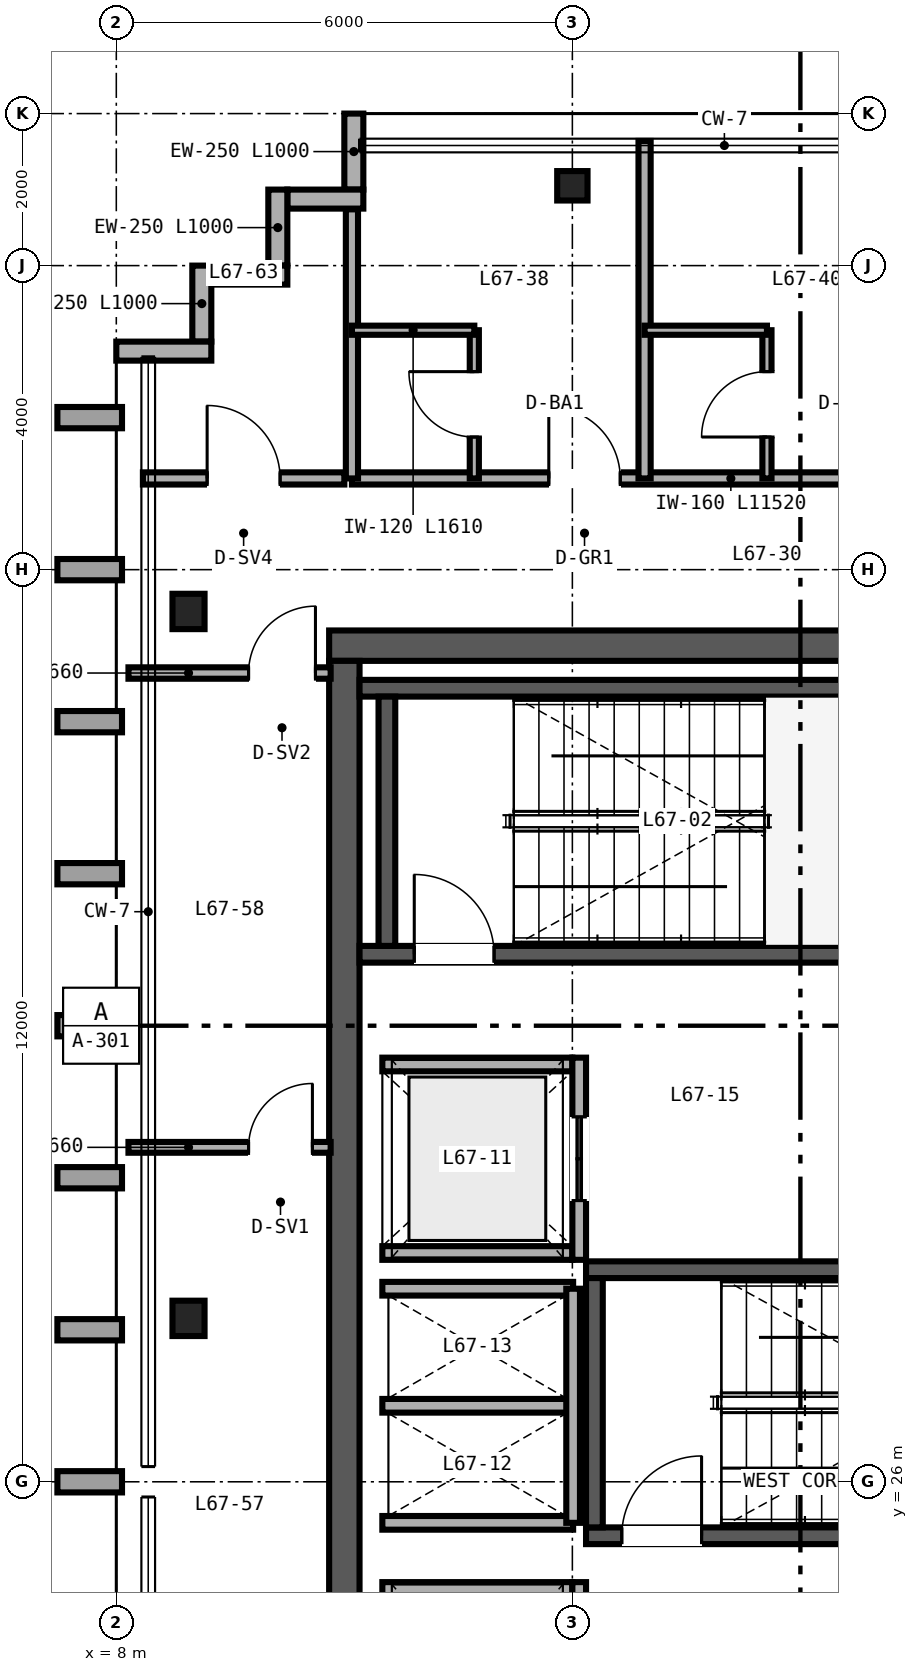
"""IFC4 building model, lengths in metres.
Left out: names, types, materials, properties, quantities, classifications, styles, units other than length and angle.
Written with IfcOpenShell. Run it as: python <this file> out.ifc"""

import sys

from ifc_helpers import new_model, si_unit, direction, frame, frame_2d, origin, origin_2d, place, context, subcontext, project, spatial, rectangle, i_section, extrude, source, transform, mapped, element, fill, save


model = new_model("IFC4")
c1 = context("Model", 3, precision=1e-05, world=origin(), true_north=direction((0.0, 1.0)))
c2 = subcontext(c1, "Body", "Model", "MODEL_VIEW")
j1 = project(units=[si_unit("LENGTHUNIT", "METRE"), si_unit("PLANEANGLEUNIT", "RADIAN")], contexts=[c1])
p1 = place(None, origin())
s1 = spatial("IfcSite", under=j1, at=p1, CompositionType="ELEMENT")
p2 = place(p1, origin())
s2 = spatial("IfcBuilding", under=s1, at=p2, CompositionType="ELEMENT")
p3 = place(p2, frame((0.0, 0.0, 265.2)))
s3 = spatial("IfcBuildingStorey", under=s2, at=p3, CompositionType="ELEMENT", Elevation=265.2)
p4 = place(p3, frame((10.8, 37.0, 0.0), z_axis=(0.0, 0.0, 1.0), x_axis=(1.0, 0.0, 0.0)))
e1 = element("IfcWall", 1, at=p4, inside=s3, PredefinedType="SHEAR", context=c2, shape_type="SweptSolid", body=[
    extrude(rectangle(XDim=12.4, YDim=0.4, at=frame_2d((6.2, 0.0))), origin(), (0.0, 0.0, 1.0), 3.38),
])
p5 = place(p4, frame((8.78, 0.0, 0.0)))
e2 = element("IfcOpeningElement", 2, at=p5, cuts=e1, PredefinedType="OPENING", context=c2, shape_type="SweptSolid", body=[
    extrude(rectangle(XDim=1.0, YDim=2.15, at=frame_2d((0.5, 1.075))), frame((0.0, 0.21, 0.0), z_axis=(0.0, -1.0, 0.0), x_axis=(1.0, 0.0, 0.0)), (0.0, 0.0, 1.0), 0.42),
])
p6 = place(p3, frame((11.0, 15.2, 0.0), z_axis=(0.0, 0.0, 1.0), x_axis=(0.0, 1.0, 0.0)))
e3 = element("IfcWall", 3, at=p6, inside=s3, PredefinedType="SHEAR", context=c2, shape_type="SweptSolid", body=[
    extrude(rectangle(XDim=21.6, YDim=0.4, at=frame_2d((10.8, 0.0))), origin(), (0.0, 0.0, 1.0), 3.38),
])
p7 = place(p3, frame((11.2, 32.94, 0.0), z_axis=(0.0, 0.0, 1.0), x_axis=(1.0, 0.0, 0.0)))
e4 = element("IfcWall", 4, at=p7, inside=s3, PredefinedType="SHEAR", context=c2, shape_type="SweptSolid", body=[
    extrude(rectangle(XDim=8.11, YDim=0.22, at=frame_2d((4.055, 0.0))), origin(), (0.0, 0.0, 1.0), 3.4),
])
p8 = place(p7, frame((0.72, 0.0, 0.0)))
e5 = element("IfcOpeningElement", 5, at=p8, cuts=e4, PredefinedType="OPENING", context=c2, shape_type="SweptSolid", body=[
    extrude(rectangle(XDim=1.05, YDim=2.15, at=frame_2d((0.525, 1.075))), frame((0.0, 0.12, 0.0), z_axis=(0.0, -1.0, 0.0), x_axis=(1.0, 0.0, 0.0)), (0.0, 0.0, 1.0), 0.24),
])
p9 = place(p3, frame((11.2, 36.44, 0.0), z_axis=(0.0, 0.0, 1.0), x_axis=(1.0, 0.0, 0.0)))
e6 = element("IfcWall", 6, at=p9, inside=s3, PredefinedType="SHEAR", context=c2, shape_type="SweptSolid", body=[
    extrude(rectangle(XDim=8.11, YDim=0.22, at=frame_2d((4.055, 0.0))), origin(), (0.0, 0.0, 1.0), 3.4),
])
p10 = place(p3, frame((11.56, 33.05, 0.0), z_axis=(0.0, 0.0, 1.0), x_axis=(0.0, 1.0, 0.0)))
e7 = element("IfcWall", 7, at=p10, inside=s3, PredefinedType="SHEAR", context=c2, shape_type="SweptSolid", body=[
    extrude(rectangle(XDim=3.28, YDim=0.22, at=frame_2d((1.64, 0.0))), origin(), (0.0, 0.0, 1.0), 3.4),
])
p11 = place(p3, frame((14.18, 25.29, 0.0), z_axis=(0.0, 0.0, 1.0), x_axis=(1.0, 0.0, 0.0)))
e8 = element("IfcWall", 8, at=p11, inside=s3, PredefinedType="SHEAR", context=c2, shape_type="SweptSolid", body=[
    extrude(rectangle(XDim=8.62, YDim=0.22, at=frame_2d((4.31, 0.0))), origin(), (0.0, 0.0, 1.0), 3.4),
])
p12 = place(p11, frame((0.47, 0.0, 0.0)))
e9 = element("IfcOpeningElement", 9, at=p12, cuts=e8, PredefinedType="OPENING", context=c2, shape_type="SweptSolid", body=[
    extrude(rectangle(XDim=1.05, YDim=2.15, at=frame_2d((0.525, 1.075))), frame((0.0, 0.12, 0.0), z_axis=(0.0, -1.0, 0.0), x_axis=(1.0, 0.0, 0.0)), (0.0, 0.0, 1.0), 0.24),
])
p13 = place(p3, frame((14.18, 28.79, 0.0), z_axis=(0.0, 0.0, 1.0), x_axis=(1.0, 0.0, 0.0)))
e10 = element("IfcWall", 10, at=p13, inside=s3, PredefinedType="SHEAR", context=c2, shape_type="SweptSolid", body=[
    extrude(rectangle(XDim=8.62, YDim=0.22, at=frame_2d((4.31, 0.0))), origin(), (0.0, 0.0, 1.0), 3.4),
])
p14 = place(p3, frame((14.29, 25.4, 0.0), z_axis=(0.0, 0.0, 1.0), x_axis=(0.0, 1.0, 0.0)))
e11 = element("IfcWall", 11, at=p14, inside=s3, PredefinedType="SHEAR", context=c2, shape_type="SweptSolid", body=[
    extrude(rectangle(XDim=3.28, YDim=0.22, at=frame_2d((1.64, 0.0))), origin(), (0.0, 0.0, 1.0), 3.4),
])
m1 = source(origin(), c2, "Body", "SweptSolid", [
    extrude(i_section(OverallWidth=0.422, OverallDepth=0.465, WebThickness=0.045, FlangeThickness=0.073, FilletRadius=0.025, at=origin_2d()), origin(), (0.0, 0.0, 1.0), 3.38),
])
for number, where, z_axis, x_axis in (
    (12, (8.95, 28.15, 0.0), (0.0, 0.0, 1.0), (1.0, 0.0, 0.0)),
    (13, (8.95, 37.45, 0.0), (0.0, 0.0, 1.0), (1.0, 0.0, 0.0)),
):
    element("IfcColumn", number, at=place(p3, frame(where, z_axis=z_axis, x_axis=x_axis)), inside=s3, PredefinedType="COLUMN", context=c2, shape_type="MappedRepresentation", body=[
        mapped(m1, transform((0.0, 0.0, 0.0), scale=1.0)),
    ])
m2 = source(origin(), c2, "Body", "SweptSolid", [
    extrude(i_section(OverallWidth=0.399, OverallDepth=0.387, WebThickness=0.021, FlangeThickness=0.033, FilletRadius=0.025, at=origin_2d()), origin(), (0.0, 0.0, 1.0), 3.38),
])
p15 = place(p3, frame((14.0, 43.05, 0.0), z_axis=(0.0, 0.0, 1.0), x_axis=(1.0, 0.0, 0.0)))
e14 = element("IfcColumn", 14, at=p15, inside=s3, PredefinedType="COLUMN", context=c2, shape_type="MappedRepresentation", body=[
    mapped(m2, transform((0.0, 0.0, 0.0), scale=1.0)),
])
for number, where, z_axis, x_axis in (
    (15, (11.125, 44.0, 0.0), (0.0, 0.0, 1.0), (0.0, -1.0, 0.0)),
    (16, (11.25, 42.875, 0.0), (0.0, 0.0, 1.0), (-1.0, 0.0, 0.0)),
    (17, (10.125, 43.0, 0.0), (0.0, 0.0, 1.0), (0.0, -1.0, 0.0)),
    (18, (10.25, 41.875, 0.0), (0.0, 0.0, 1.0), (-1.0, 0.0, 0.0)),
    (19, (9.125, 42.0, 0.0), (0.0, 0.0, 1.0), (0.0, -1.0, 0.0)),
):
    element("IfcWall", number, at=place(p3, frame(where, z_axis=z_axis, x_axis=x_axis)), inside=s3, PredefinedType="SOLIDWALL", context=c2, shape_type="SweptSolid", body=[
        extrude(rectangle(XDim=1.0, YDim=0.25, at=frame_2d((0.5, 0.0))), origin(), (0.0, 0.0, 1.0), 3.38),
    ])
p16 = place(p3, frame((9.25, 40.875, 0.0), z_axis=(0.0, 0.0, 1.0), x_axis=(-1.0, 0.0, 0.0)))
e20 = element("IfcWall", 20, at=p16, inside=s3, PredefinedType="SOLIDWALL", context=c2, shape_type="SweptSolid", body=[
    extrude(rectangle(XDim=1.25, YDim=0.25, at=frame_2d((0.625, 0.0))), origin(), (0.0, 0.0, 1.0), 3.38),
])
p17 = place(p3, frame((11.5, 24.59, 0.0), z_axis=(0.0, 0.0, 1.0), x_axis=(1.0, 0.0, 0.0)))
e21 = element("IfcWall", 21, at=p17, inside=s3, PredefinedType="SOLIDWALL", context=c2, shape_type="SweptSolid", body=[
    extrude(rectangle(XDim=2.5, YDim=0.18, at=frame_2d((1.25, 0.0))), origin(), (0.0, 0.0, 1.0), 3.38),
])
p18 = place(p3, frame((14.09, 22.02, 0.0), z_axis=(0.0, 0.0, 1.0), x_axis=(0.0, 1.0, 0.0)))
e22 = element("IfcWall", 22, at=p18, inside=s3, PredefinedType="SOLIDWALL", context=c2, shape_type="SweptSolid", body=[
    extrude(rectangle(XDim=2.66, YDim=0.18, at=frame_2d((1.33, 0.0))), origin(), (0.0, 0.0, 1.0), 3.38),
])
p19 = place(p18, frame((0.78, 0.0, 0.0)))
e23 = element("IfcOpeningElement", 23, at=p19, cuts=e22, PredefinedType="OPENING", context=c2, shape_type="SweptSolid", body=[
    extrude(rectangle(XDim=1.1, YDim=2.2, at=frame_2d((0.55, 1.1))), frame((0.0, 0.1, 0.0), z_axis=(0.0, -1.0, 0.0), x_axis=(1.0, 0.0, 0.0)), (0.0, 0.0, 1.0), 0.2),
])
for number, where, z_axis, x_axis in (
    (24, (11.5, 29.01, 0.0), (0.0, 0.0, 1.0), (1.0, 0.0, 0.0)),
    (25, (11.5, 31.49, 0.0), (0.0, 0.0, 1.0), (1.0, 0.0, 0.0)),
):
    element("IfcWall", number, at=place(p3, frame(where, z_axis=z_axis, x_axis=x_axis)), inside=s3, PredefinedType="SOLIDWALL", context=c2, shape_type="SweptSolid", body=[
        extrude(rectangle(XDim=2.5, YDim=0.18, at=frame_2d((1.25, 0.0))), origin(), (0.0, 0.0, 1.0), 3.38),
    ])
p20 = place(p3, frame((14.09, 28.92, 0.0), z_axis=(0.0, 0.0, 1.0), x_axis=(0.0, 1.0, 0.0)))
e26 = element("IfcWall", 26, at=p20, inside=s3, PredefinedType="SOLIDWALL", context=c2, shape_type="SweptSolid", body=[
    extrude(rectangle(XDim=2.66, YDim=0.18, at=frame_2d((1.33, 0.0))), origin(), (0.0, 0.0, 1.0), 3.38),
])
p21 = place(p20, frame((0.78, 0.0, 0.0)))
e27 = element("IfcOpeningElement", 27, at=p21, cuts=e26, PredefinedType="OPENING", context=c2, shape_type="SweptSolid", body=[
    extrude(rectangle(XDim=1.1, YDim=2.2, at=frame_2d((0.55, 1.1))), frame((0.0, 0.1, 0.0), z_axis=(0.0, -1.0, 0.0), x_axis=(1.0, 0.0, 0.0)), (0.0, 0.0, 1.0), 0.2),
])
for number, where, z_axis, x_axis in (
    (28, (11.5, 25.46, 0.0), (0.0, 0.0, 1.0), (1.0, 0.0, 0.0)),
    (29, (11.5, 27.0, 0.0), (0.0, 0.0, 1.0), (1.0, 0.0, 0.0)),
    (30, (11.5, 28.54, 0.0), (0.0, 0.0, 1.0), (1.0, 0.0, 0.0)),
):
    element("IfcWall", number, at=place(p3, frame(where, z_axis=z_axis, x_axis=x_axis)), inside=s3, PredefinedType="SOLIDWALL", context=c2, shape_type="SweptSolid", body=[
        extrude(rectangle(XDim=2.51, YDim=0.18, at=frame_2d((1.255, 0.0))), origin(), (0.0, 0.0, 1.0), 3.38),
    ])
p22 = place(p3, frame((14.01, 25.46, 0.0), z_axis=(0.0, 0.0, 1.0), x_axis=(0.0, 1.0, 0.0)))
e31 = element("IfcWall", 31, at=p22, inside=s3, PredefinedType="SOLIDWALL", context=c2, shape_type="SweptSolid", body=[
    extrude(rectangle(XDim=3.08, YDim=0.18, at=frame_2d((1.54, 0.0))), origin(), (0.0, 0.0, 1.0), 3.38),
])
p23 = place(p3, frame((11.1, 39.2, 0.0), z_axis=(0.0, 0.0, 1.0), x_axis=(1.0, 0.0, 0.0)))
e32 = element("IfcWall", 32, at=p23, inside=s3, PredefinedType="PARTITIONING", context=c2, shape_type="SweptSolid", body=[
    extrude(rectangle(XDim=11.52, YDim=0.16, at=frame_2d((5.76, 0.0))), origin(), (0.0, 0.0, 1.0), 3.38),
])
p24 = place(p23, frame((2.59, 0.0, 0.0)))
e33 = element("IfcOpeningElement", 33, at=p24, cuts=e32, PredefinedType="OPENING", context=c2, shape_type="SweptSolid", body=[
    extrude(rectangle(XDim=0.94, YDim=2.15, at=frame_2d((0.47, 1.075))), frame((0.0, 0.09, 0.0), z_axis=(0.0, -1.0, 0.0), x_axis=(1.0, 0.0, 0.0)), (0.0, 0.0, 1.0), 0.18),
])
p25 = place(p23, frame((6.44, 0.0, 0.0)))
e34 = element("IfcOpeningElement", 34, at=p25, cuts=e32, PredefinedType="OPENING", context=c2, shape_type="SweptSolid", body=[
    extrude(rectangle(XDim=0.94, YDim=2.15, at=frame_2d((0.47, 1.075))), frame((0.0, 0.09, 0.0), z_axis=(0.0, -1.0, 0.0), x_axis=(1.0, 0.0, 0.0)), (0.0, 0.0, 1.0), 0.18),
])
p26 = place(p23, frame((9.13, 0.0, 0.0)))
e35 = element("IfcOpeningElement", 35, at=p26, cuts=e32, PredefinedType="OPENING", context=c2, shape_type="SweptSolid", body=[
    extrude(rectangle(XDim=0.96, YDim=2.15, at=frame_2d((0.48, 1.075))), frame((0.0, 0.09, 0.0), z_axis=(0.0, -1.0, 0.0), x_axis=(1.0, 0.0, 0.0)), (0.0, 0.0, 1.0), 0.18),
])
p27 = place(p3, frame((11.1, 39.2, 0.0), z_axis=(0.0, 0.0, 1.0), x_axis=(0.0, 1.0, 0.0)))
e36 = element("IfcWall", 36, at=p27, inside=s3, PredefinedType="PARTITIONING", context=c2, shape_type="SweptSolid", body=[
    extrude(rectangle(XDim=3.54, YDim=0.16, at=frame_2d((1.77, 0.0))), origin(), (0.0, 0.0, 1.0), 3.38),
])
p28 = place(p3, frame((14.95, 39.2, 0.0), z_axis=(0.0, 0.0, 1.0), x_axis=(0.0, 1.0, 0.0)))
e37 = element("IfcWall", 37, at=p28, inside=s3, PredefinedType="PARTITIONING", context=c2, shape_type="SweptSolid", body=[
    extrude(rectangle(XDim=4.44, YDim=0.16, at=frame_2d((2.22, 0.0))), origin(), (0.0, 0.0, 1.0), 2.687),
])
p29 = place(p3, frame((12.71, 39.2, 0.0), z_axis=(0.0, 0.0, 1.0), x_axis=(0.0, 1.0, 0.0)))
e38 = element("IfcWall", 38, at=p29, inside=s3, PredefinedType="PARTITIONING", context=c2, shape_type="SweptSolid", body=[
    extrude(rectangle(XDim=1.95, YDim=0.12, at=frame_2d((0.975, 0.0))), origin(), (0.0, 0.0, 1.0), 3.38),
])
p30 = place(p29, frame((0.545, 0.0, 0.0)))
e39 = element("IfcOpeningElement", 39, at=p30, cuts=e38, PredefinedType="OPENING", context=c2, shape_type="SweptSolid", body=[
    extrude(rectangle(XDim=0.86, YDim=2.1, at=frame_2d((0.43, 1.05))), frame((0.0, 0.07, 0.0), z_axis=(0.0, -1.0, 0.0), x_axis=(1.0, 0.0, 0.0)), (0.0, 0.0, 1.0), 0.14),
])
p31 = place(p3, frame((11.1, 41.15, 0.0), z_axis=(0.0, 0.0, 1.0), x_axis=(1.0, 0.0, 0.0)))
e40 = element("IfcWall", 40, at=p31, inside=s3, PredefinedType="PARTITIONING", context=c2, shape_type="SweptSolid", body=[
    extrude(rectangle(XDim=1.61, YDim=0.12, at=frame_2d((0.805, 0.0))), origin(), (0.0, 0.0, 1.0), 3.38),
])
p32 = place(p3, frame((16.56, 39.2, 0.0), z_axis=(0.0, 0.0, 1.0), x_axis=(0.0, 1.0, 0.0)))
e41 = element("IfcWall", 41, at=p32, inside=s3, PredefinedType="PARTITIONING", context=c2, shape_type="SweptSolid", body=[
    extrude(rectangle(XDim=1.95, YDim=0.12, at=frame_2d((0.975, 0.0))), origin(), (0.0, 0.0, 1.0), 3.38),
])
p33 = place(p32, frame((0.545, 0.0, 0.0)))
e42 = element("IfcOpeningElement", 42, at=p33, cuts=e41, PredefinedType="OPENING", context=c2, shape_type="SweptSolid", body=[
    extrude(rectangle(XDim=0.86, YDim=2.1, at=frame_2d((0.43, 1.05))), frame((0.0, 0.07, 0.0), z_axis=(0.0, -1.0, 0.0), x_axis=(1.0, 0.0, 0.0)), (0.0, 0.0, 1.0), 0.14),
])
p34 = place(p3, frame((14.95, 41.15, 0.0), z_axis=(0.0, 0.0, 1.0), x_axis=(1.0, 0.0, 0.0)))
e43 = element("IfcWall", 43, at=p34, inside=s3, PredefinedType="PARTITIONING", context=c2, shape_type="SweptSolid", body=[
    extrude(rectangle(XDim=1.61, YDim=0.12, at=frame_2d((0.805, 0.0))), origin(), (0.0, 0.0, 1.0), 3.38),
])
p35 = place(p3, frame((8.16, 36.64, 0.0), z_axis=(0.0, 0.0, 1.0), x_axis=(1.0, 0.0, 0.0)))
e44 = element("IfcWall", 44, at=p35, inside=s3, PredefinedType="PARTITIONING", context=c2, shape_type="SweptSolid", body=[
    extrude(rectangle(XDim=2.66, YDim=0.15, at=frame_2d((1.33, 0.0))), origin(), (0.0, 0.0, 1.0), 2.763),
])
p36 = place(p35, frame((1.58, 0.0, 0.0)))
e45 = element("IfcOpeningElement", 45, at=p36, cuts=e44, PredefinedType="OPENING", context=c2, shape_type="SweptSolid", body=[
    extrude(rectangle(XDim=0.88, YDim=2.15, at=frame_2d((0.44, 1.075))), frame((0.0, 0.085, 0.0), z_axis=(0.0, -1.0, 0.0), x_axis=(1.0, 0.0, 0.0)), (0.0, 0.0, 1.0), 0.17),
])
p37 = place(p3, frame((8.16, 30.4, 0.0), z_axis=(0.0, 0.0, 1.0), x_axis=(1.0, 0.0, 0.0)))
e46 = element("IfcWall", 46, at=p37, inside=s3, PredefinedType="PARTITIONING", context=c2, shape_type="SweptSolid", body=[
    extrude(rectangle(XDim=2.66, YDim=0.142, at=frame_2d((1.33, 0.0))), origin(), (0.0, 0.0, 1.0), 2.763),
])
p38 = place(p37, frame((1.58, 0.0, 0.0)))
e47 = element("IfcOpeningElement", 47, at=p38, cuts=e46, PredefinedType="OPENING", context=c2, shape_type="SweptSolid", body=[
    extrude(rectangle(XDim=0.84, YDim=2.1, at=frame_2d((0.42, 1.05))), frame((0.0, 0.081, 0.0), z_axis=(0.0, -1.0, 0.0), x_axis=(1.0, 0.0, 0.0)), (0.0, 0.0, 1.0), 0.162),
])
p39 = place(p3, frame((8.35, 39.2, 0.0), z_axis=(0.0, 0.0, 1.0), x_axis=(1.0, 0.0, 0.0)))
e48 = element("IfcWall", 48, at=p39, inside=s3, PredefinedType="PARTITIONING", context=c2, shape_type="SweptSolid", body=[
    extrude(rectangle(XDim=2.65, YDim=0.16, at=frame_2d((1.325, 0.0))), origin(), (0.0, 0.0, 1.0), 3.38),
])
p40 = place(p39, frame((0.845, 0.0, 0.0)))
e49 = element("IfcOpeningElement", 49, at=p40, cuts=e48, PredefinedType="OPENING", context=c2, shape_type="SweptSolid", body=[
    extrude(rectangle(XDim=0.96, YDim=2.15, at=frame_2d((0.48, 1.075))), frame((0.0, 0.09, 0.0), z_axis=(0.0, -1.0, 0.0), x_axis=(1.0, 0.0, 0.0)), (0.0, 0.0, 1.0), 0.18),
])
m3 = source(origin(), c2, "Body", "SweptSolid", [
    extrude(rectangle(XDim=1.05, YDim=2.15, at=frame_2d((0.525, 1.075))), frame((0.0, 0.025, 0.0), z_axis=(0.0, -1.0, 0.0), x_axis=(1.0, 0.0, 0.0)), (0.0, 0.0, 1.0), 0.05),
])
p41 = place(p8, origin())
e50 = element("IfcDoor", 50, at=p41, inside=s3, OperationType="SINGLE_SWING_LEFT", PredefinedType="DOOR", context=c2, shape_type="MappedRepresentation", body=[
    mapped(m3, transform((0.0, 0.0, 0.0), scale=1.0)),
])
fill(e5, e50)
p42 = place(p12, origin())
e51 = element("IfcDoor", 51, at=p42, inside=s3, OperationType="SINGLE_SWING_RIGHT", PredefinedType="DOOR", context=c2, shape_type="MappedRepresentation", body=[
    mapped(m3, transform((0.0, 0.0, 0.0), scale=1.0)),
])
fill(e9, e51)
m4 = source(origin(), c2, "Body", "SweptSolid", [
    extrude(rectangle(XDim=1.1, YDim=2.2, at=frame_2d((0.55, 1.1))), frame((0.0, 0.025, 0.0), z_axis=(0.0, -1.0, 0.0), x_axis=(1.0, 0.0, 0.0)), (0.0, 0.0, 1.0), 0.05),
])
p43 = place(p21, origin())
e52 = element("IfcDoor", 52, at=p43, inside=s3, OperationType="DOUBLE_DOOR_SLIDING", PredefinedType="DOOR", context=c2, shape_type="MappedRepresentation", body=[
    mapped(m4, transform((0.0, 0.0, 0.0), scale=1.0)),
])
fill(e27, e52)
m5 = source(origin(), c2, "Body", "SweptSolid", [
    extrude(rectangle(XDim=0.86, YDim=2.1, at=frame_2d((0.43, 1.05))), frame((0.0, 0.025, 0.0), z_axis=(0.0, -1.0, 0.0), x_axis=(1.0, 0.0, 0.0)), (0.0, 0.0, 1.0), 0.05),
])
p44 = place(p30, origin())
e53 = element("IfcDoor", 53, at=p44, inside=s3, OperationType="SINGLE_SWING_RIGHT", PredefinedType="DOOR", context=c2, shape_type="MappedRepresentation", body=[
    mapped(m5, transform((0.0, 0.0, 0.0), scale=1.0)),
])
fill(e39, e53)
p45 = place(p33, origin())
e54 = element("IfcDoor", 54, at=p45, inside=s3, OperationType="SINGLE_SWING_LEFT", PredefinedType="DOOR", context=c2, shape_type="MappedRepresentation", body=[
    mapped(m5, transform((0.0, 0.0, 0.0), scale=1.0)),
])
fill(e42, e54)
m6 = source(origin(), c2, "Body", "SweptSolid", [
    extrude(rectangle(XDim=0.94, YDim=2.15, at=frame_2d((0.47, 1.075))), frame((0.0, 0.025, 0.0), z_axis=(0.0, -1.0, 0.0), x_axis=(1.0, 0.0, 0.0)), (0.0, 0.0, 1.0), 0.05),
])
p46 = place(p24, origin())
e55 = element("IfcDoor", 55, at=p46, inside=s3, OperationType="SINGLE_SWING_LEFT", PredefinedType="DOOR", context=c2, shape_type="MappedRepresentation", body=[
    mapped(m6, transform((0.0, 0.0, 0.0), scale=1.0)),
])
fill(e33, e55)
m7 = source(origin(), c2, "Body", "SweptSolid", [
    extrude(rectangle(XDim=0.88, YDim=2.15, at=frame_2d((0.44, 1.075))), frame((0.0, 0.025, 0.0), z_axis=(0.0, -1.0, 0.0), x_axis=(1.0, 0.0, 0.0)), (0.0, 0.0, 1.0), 0.05),
])
p47 = place(p36, origin())
e56 = element("IfcDoor", 56, at=p47, inside=s3, OperationType="SINGLE_SWING_RIGHT", PredefinedType="DOOR", context=c2, shape_type="MappedRepresentation", body=[
    mapped(m7, transform((0.0, 0.0, 0.0), scale=1.0)),
])
fill(e45, e56)
m8 = source(origin(), c2, "Body", "SweptSolid", [
    extrude(rectangle(XDim=0.84, YDim=2.1, at=frame_2d((0.42, 1.05))), frame((0.0, 0.025, 0.0), z_axis=(0.0, -1.0, 0.0), x_axis=(1.0, 0.0, 0.0)), (0.0, 0.0, 1.0), 0.05),
])
p48 = place(p38, origin())
e57 = element("IfcDoor", 57, at=p48, inside=s3, OperationType="SINGLE_SWING_RIGHT", PredefinedType="DOOR", context=c2, shape_type="MappedRepresentation", body=[
    mapped(m8, transform((0.0, 0.0, 0.0), scale=1.0)),
])
fill(e47, e57)
m9 = source(origin(), c2, "Body", "SweptSolid", [
    extrude(rectangle(XDim=0.96, YDim=2.15, at=frame_2d((0.48, 1.075))), frame((0.0, 0.025, 0.0), z_axis=(0.0, -1.0, 0.0), x_axis=(1.0, 0.0, 0.0)), (0.0, 0.0, 1.0), 0.05),
])
p49 = place(p40, origin())
e58 = element("IfcDoor", 58, at=p49, inside=s3, OperationType="SINGLE_SWING_LEFT", PredefinedType="DOOR", context=c2, shape_type="MappedRepresentation", body=[
    mapped(m9, transform((0.0, 0.0, 0.0), scale=1.0)),
])
fill(e49, e58)
save(model, sys.argv[1])
